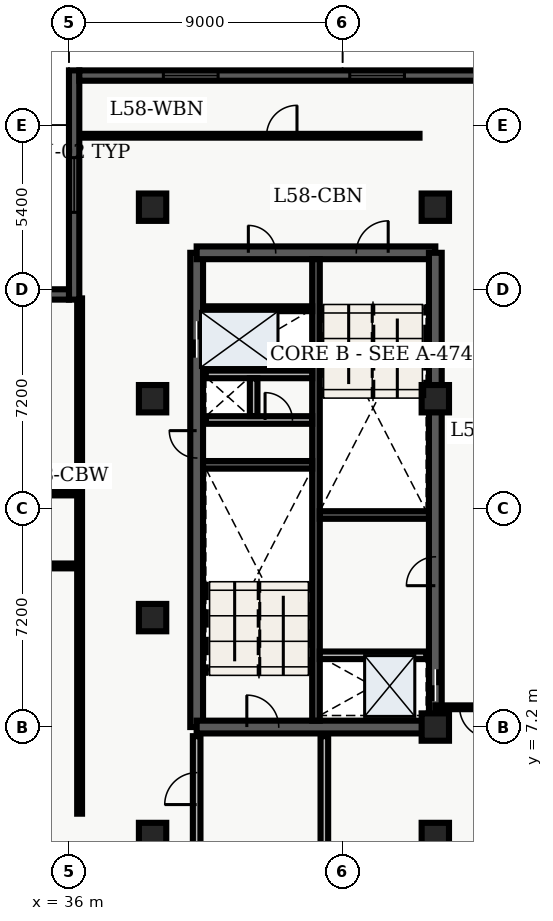
"""IFC4 building model, lengths in metres.
Left out: names, types, materials, properties, quantities, classifications, styles, units other than length and angle.
Written with IfcOpenShell. Run it as: python <this file> out.ifc"""

import sys

from ifc_helpers import new_model, entity, si_unit, converted_unit, direction, frame, origin_with_axes, origin_2d_with_axis, place, context, subcontext, project, spatial, polyline, rectangle, outline, extrude, element, fill, save


model = new_model("IFC4")
c1 = context("Model", 3, precision=1e-05, world=origin_with_axes(), true_north=direction((0.0, 1.0)))
c2 = subcontext(c1, "Body", "Model", "MODEL_VIEW")
j1 = project(units=[si_unit("LENGTHUNIT", "METRE"), converted_unit("PLANEANGLEUNIT", "DEGREE", entity("IfcPlaneAngleMeasure", 0.017), si_unit("PLANEANGLEUNIT", "RADIAN"), dimensions=[0, 0, 0, 0, 0, 0, 0])], contexts=[c1])
p1 = place(None, origin_with_axes())
s1 = spatial("IfcSite", under=j1, at=p1, CompositionType="ELEMENT")
p2 = place(p1, origin_with_axes())
s2 = spatial("IfcBuilding", under=s1, at=p2, CompositionType="ELEMENT")
p3 = place(p2, frame((0.0, 0.0, 236.4), z_axis=(0.0, 0.0, 1.0), x_axis=(1.0, 0.0, 0.0)))
s3 = spatial("IfcBuildingStorey", under=s2, at=p3, CompositionType="ELEMENT", Elevation=236.4)
p4 = place(p3, frame((40.2, 7.2, 0.0), z_axis=(0.0, 0.0, 1.0), x_axis=(0.0, 1.0, 0.0)))
e1 = element("IfcWall", 1, at=p4, inside=s3, PredefinedType="SHEAR", context=c2, shape_type="SweptSolid", body=[
    extrude(outline(polyline([(0.0, -0.21), (15.6, -0.21), (15.6, 0.21), (0.0, 0.21), (0.0, -0.21)])), origin_with_axes(), (0.0, 0.0, 1.0), 3.66),
])
p5 = place(p4, frame((12.75, 0.0, 0.0), z_axis=(0.0, 0.0, 1.0), x_axis=(1.0, 0.0, 0.0)))
e2 = element("IfcOpeningElement", 2, at=p5, cuts=e1, PredefinedType="OPENING", context=c2, shape_type="SweptSolid", body=[
    extrude(rectangle(XDim=1.2, YDim=0.44, at=origin_2d_with_axis()), origin_with_axes(), (0.0, 0.0, 1.0), 2.15),
])
p6 = place(p4, frame((9.3, 0.0, 0.0), z_axis=(0.0, 0.0, 1.0), x_axis=(1.0, 0.0, 0.0)))
e3 = element("IfcOpeningElement", 3, at=p6, cuts=e1, PredefinedType="OPENING", context=c2, shape_type="SweptSolid", body=[
    extrude(rectangle(XDim=0.9, YDim=0.44, at=origin_2d_with_axis()), origin_with_axes(), (0.0, 0.0, 1.0), 2.15),
])
p7 = place(p3, frame((40.2, 7.2, 0.0), z_axis=(0.0, 0.0, 1.0), x_axis=(1.0, 0.0, 0.0)))
e4 = element("IfcWall", 4, at=p7, inside=s3, PredefinedType="SHEAR", context=c2, shape_type="SweptSolid", body=[
    extrude(outline(polyline([(0.0, -0.21), (7.85, -0.21), (7.85, 0.21), (0.0, 0.21), (0.0, -0.21)])), origin_with_axes(), (0.0, 0.0, 1.0), 3.66),
])
p8 = place(p7, frame((2.175, 0.0, 0.0), z_axis=(0.0, 0.0, 1.0), x_axis=(1.0, 0.0, 0.0)))
e5 = element("IfcOpeningElement", 5, at=p8, cuts=e4, PredefinedType="OPENING", context=c2, shape_type="SweptSolid", body=[
    extrude(rectangle(XDim=1.05, YDim=0.44, at=origin_2d_with_axis()), origin_with_axes(), (0.0, 0.0, 1.0), 2.15),
])
p9 = place(p3, frame((40.2, 22.8, 0.0), z_axis=(0.0, 0.0, 1.0), x_axis=(1.0, 0.0, 0.0)))
e6 = element("IfcWall", 6, at=p9, inside=s3, PredefinedType="SHEAR", context=c2, shape_type="SweptSolid", body=[
    extrude(outline(polyline([(0.0, -0.21), (7.85, -0.21), (7.85, 0.21), (0.0, 0.21), (0.0, -0.21)])), origin_with_axes(), (0.0, 0.0, 1.0), 3.66),
])
p10 = place(p9, frame((5.775, 0.0, 0.0), z_axis=(0.0, 0.0, 1.0), x_axis=(1.0, 0.0, 0.0)))
e7 = element("IfcOpeningElement", 7, at=p10, cuts=e6, PredefinedType="OPENING", context=c2, shape_type="SweptSolid", body=[
    extrude(rectangle(XDim=1.05, YDim=0.44, at=origin_2d_with_axis()), origin_with_axes(), (0.0, 0.0, 1.0), 2.15),
])
p11 = place(p9, frame((2.15, 0.0, 0.0), z_axis=(0.0, 0.0, 1.0), x_axis=(1.0, 0.0, 0.0)))
e8 = element("IfcOpeningElement", 8, at=p11, cuts=e6, PredefinedType="OPENING", context=c2, shape_type="SweptSolid", body=[
    extrude(rectangle(XDim=0.9, YDim=0.44, at=origin_2d_with_axis()), origin_with_axes(), (0.0, 0.0, 1.0), 2.15),
])
p12 = place(p3, frame((48.05, 7.2, 0.0), z_axis=(0.0, 0.0, 1.0), x_axis=(0.0, 1.0, 0.0)))
e9 = element("IfcWall", 9, at=p12, inside=s3, PredefinedType="SHEAR", context=c2, shape_type="SweptSolid", body=[
    extrude(outline(polyline([(0.0, -0.21), (15.6, -0.21), (15.6, 0.21), (0.0, 0.21), (0.0, -0.21)])), origin_with_axes(), (0.0, 0.0, 1.0), 3.66),
])
p13 = place(p12, frame((1.375, 0.0, 0.0), z_axis=(0.0, 0.0, 1.0), x_axis=(1.0, 0.0, 0.0)))
e10 = element("IfcOpeningElement", 10, at=p13, cuts=e9, PredefinedType="OPENING", context=c2, shape_type="SweptSolid", body=[
    extrude(rectangle(XDim=1.05, YDim=0.44, at=origin_2d_with_axis()), origin_with_axes(), (0.0, 0.0, 1.0), 2.15),
])
p14 = place(p12, frame((5.125, 0.0, 0.0), z_axis=(0.0, 0.0, 1.0), x_axis=(1.0, 0.0, 0.0)))
e11 = element("IfcOpeningElement", 11, at=p14, cuts=e9, PredefinedType="OPENING", context=c2, shape_type="SweptSolid", body=[
    extrude(rectangle(XDim=0.95, YDim=0.44, at=origin_2d_with_axis()), origin_with_axes(), (0.0, 0.0, 1.0), 2.15),
])
p15 = place(p3, frame((44.125, 7.41, 0.0), z_axis=(0.0, 0.0, 1.0), x_axis=(0.0, 1.0, 0.0)))
e12 = element("IfcWall", 12, at=p15, inside=s3, PredefinedType="SHEAR", context=c2, shape_type="SweptSolid", body=[
    extrude(outline(polyline([(0.0, -0.125), (15.18, -0.125), (15.18, 0.125), (0.0, 0.125), (0.0, -0.125)])), origin_with_axes(), (0.0, 0.0, 1.0), 3.66),
])
for number, where, z_axis, x_axis in (
    (13, (40.41, 15.825, 0.0), (0.0, 0.0, 1.0), (1.0, 0.0, 0.0)),
    (14, (44.25, 14.175, 0.0), (0.0, 0.0, 1.0), (1.0, 0.0, 0.0)),
):
    element("IfcWall", number, at=place(p3, frame(where, z_axis=z_axis, x_axis=x_axis)), inside=s3, PredefinedType="SHEAR", context=c2, shape_type="SweptSolid", body=[
        extrude(outline(polyline([(0.0, -0.125), (3.59, -0.125), (3.59, 0.125), (0.0, 0.125), (0.0, -0.125)])), origin_with_axes(), (0.0, 0.0, 1.0), 3.66),
    ])
p16 = place(p3, frame((40.5, 17.3, 0.0), z_axis=(0.0, 0.0, 1.0), x_axis=(1.0, 0.0, 0.0)))
e15 = element("IfcWall", 15, at=p16, inside=s3, PredefinedType="SOLIDWALL", context=c2, shape_type="SweptSolid", body=[
    extrude(outline(polyline([(0.0, -0.125), (3.5, -0.125), (3.5, 0.125), (0.0, 0.125), (0.0, -0.125)])), origin_with_axes(), (0.0, 0.0, 1.0), 2.7),
])
p17 = place(p16, frame((2.4, 0.0, 0.0), z_axis=(0.0, 0.0, 1.0), x_axis=(1.0, 0.0, 0.0)))
e16 = element("IfcOpeningElement", 16, at=p17, cuts=e15, PredefinedType="OPENING", context=c2, shape_type="SweptSolid", body=[
    extrude(rectangle(XDim=0.9, YDim=0.27, at=origin_2d_with_axis()), origin_with_axes(), (0.0, 0.0, 1.0), 2.15),
])
p18 = place(p3, frame((40.5, 18.8, 0.0), z_axis=(0.0, 0.0, 1.0), x_axis=(1.0, 0.0, 0.0)))
e17 = element("IfcWall", 17, at=p18, inside=s3, PredefinedType="SOLIDWALL", context=c2, shape_type="SweptSolid", body=[
    extrude(outline(polyline([(0.0, -0.125), (3.5, -0.125), (3.5, 0.125), (0.0, 0.125), (0.0, -0.125)])), origin_with_axes(), (0.0, 0.0, 1.0), 2.7),
])
p19 = place(p3, frame((42.075, 17.43, 0.0), z_axis=(0.0, 0.0, 1.0), x_axis=(0.0, 1.0, 0.0)))
e18 = element("IfcWall", 18, at=p19, inside=s3, PredefinedType="SOLIDWALL", context=c2, shape_type="SweptSolid", body=[
    extrude(outline(polyline([(0.0, -0.125), (1.24, -0.125), (1.24, 0.125), (0.0, 0.125), (0.0, -0.125)])), origin_with_axes(), (0.0, 0.0, 1.0), 2.7),
])
p20 = place(p3, frame((40.2, 3.1, 0.0), z_axis=(0.0, 0.0, 1.0), x_axis=(0.0, 1.0, 0.0)))
e19 = element("IfcWall", 19, at=p20, inside=s3, PredefinedType="SOLIDWALL", context=c2, shape_type="SweptSolid", body=[
    extrude(outline(polyline([(0.0, -0.125), (3.8, -0.125), (3.8, 0.125), (0.0, 0.125), (0.0, -0.125)])), origin_with_axes(), (0.0, 0.0, 1.0), 2.7),
])
p21 = place(p20, frame((2.075, 0.0, 0.0), z_axis=(0.0, 0.0, 1.0), x_axis=(1.0, 0.0, 0.0)))
e20 = element("IfcOpeningElement", 20, at=p21, cuts=e19, PredefinedType="OPENING", context=c2, shape_type="SweptSolid", body=[
    extrude(rectangle(XDim=1.05, YDim=0.27, at=origin_2d_with_axis()), origin_with_axes(), (0.0, 0.0, 1.0), 2.15),
])
p22 = place(p3, frame((44.4, 3.1, 0.0), z_axis=(0.0, 0.0, 1.0), x_axis=(0.0, 1.0, 0.0)))
e21 = element("IfcWall", 21, at=p22, inside=s3, PredefinedType="SOLIDWALL", context=c2, shape_type="SweptSolid", body=[
    extrude(outline(polyline([(0.0, -0.125), (3.8, -0.125), (3.8, 0.125), (0.0, 0.125), (0.0, -0.125)])), origin_with_axes(), (0.0, 0.0, 1.0), 2.7),
])
for number, where, z_axis, x_axis in (
    (22, (38.75, 3.6, 0.0), (0.0, 0.0, 1.0), (1.0, 0.0, 0.0)),
    (23, (38.75, 10.8, 0.0), (0.0, 0.0, 1.0), (1.0, 0.0, 0.0)),
    (24, (38.75, 18.0, 0.0), (0.0, 0.0, 1.0), (1.0, 0.0, 0.0)),
    (25, (38.75, 24.3, 0.0), (0.0, 0.0, 1.0), (1.0, 0.0, 0.0)),
    (26, (48.05, 3.6, 0.0), (0.0, 0.0, 1.0), (1.0, 0.0, 0.0)),
    (27, (48.05, 7.2, 0.0), (0.0, 0.0, 1.0), (1.0, 0.0, 0.0)),
    (28, (48.05, 18.0, 0.0), (0.0, 0.0, 1.0), (1.0, 0.0, 0.0)),
    (29, (48.05, 24.3, 0.0), (0.0, 0.0, 1.0), (1.0, 0.0, 0.0)),
):
    element("IfcColumn", number, at=place(p3, frame(where, z_axis=z_axis, x_axis=x_axis)), inside=s3, PredefinedType="COLUMN", context=c2, shape_type="SweptSolid", body=[
        extrude(rectangle(XDim=0.9, YDim=0.9, at=origin_2d_with_axis()), origin_with_axes(), (0.0, 0.0, 1.0), 3.9),
    ])
p23 = place(p3, frame((40.5, 20.96, 0.0), z_axis=(0.0, 0.0, 1.0), x_axis=(1.0, 0.0, 0.0)))
e30 = element("IfcWall", 30, at=p23, inside=s3, PredefinedType="PARTITIONING", context=c2, shape_type="SweptSolid", body=[
    extrude(outline(polyline([(0.0, -0.08), (3.5, -0.08), (3.5, 0.08), (0.0, 0.08), (0.0, -0.08)])), origin_with_axes(), (0.0, 0.0, 1.0), 2.7),
])
p24 = place(p3, frame((44.25, 9.56, 0.0), z_axis=(0.0, 0.0, 1.0), x_axis=(1.0, 0.0, 0.0)))
e31 = element("IfcWall", 31, at=p24, inside=s3, PredefinedType="SOLIDWALL", context=c2, shape_type="SweptSolid", body=[
    extrude(outline(polyline([(0.0, -0.125), (3.5, -0.125), (3.5, 0.125), (0.0, 0.125), (0.0, -0.125)])), origin_with_axes(), (0.0, 0.0, 1.0), 2.7),
])
p25 = place(p3, frame((20.3, 12.5, 0.0), z_axis=(0.0, 0.0, 1.0), x_axis=(1.0, 0.0, 0.0)))
e32 = element("IfcWall", 32, at=p25, inside=s3, PredefinedType="PARTITIONING", context=c2, shape_type="SweptSolid", body=[
    extrude(outline(polyline([(0.0, -0.08), (16.05, -0.08), (16.05, 0.08), (0.0, 0.08), (0.0, -0.08)])), origin_with_axes(), (0.0, 0.0, 1.0), 2.7),
])
p26 = place(p25, frame((3.865, 0.0, 0.0), z_axis=(0.0, 0.0, 1.0), x_axis=(1.0, 0.0, 0.0)))
e33 = element("IfcOpeningElement", 33, at=p26, cuts=e32, PredefinedType="OPENING", context=c2, shape_type="SweptSolid", body=[
    extrude(rectangle(XDim=1.2, YDim=0.18, at=origin_2d_with_axis()), origin_with_axes(), (0.0, 0.0, 1.0), 2.2),
])
p27 = place(p25, frame((9.48, 0.0, 0.0), z_axis=(0.0, 0.0, 1.0), x_axis=(1.0, 0.0, 0.0)))
e34 = element("IfcOpeningElement", 34, at=p27, cuts=e32, PredefinedType="OPENING", context=c2, shape_type="SweptSolid", body=[
    extrude(rectangle(XDim=1.0, YDim=0.18, at=origin_2d_with_axis()), origin_with_axes(), (0.0, 0.0, 1.0), 2.15),
])
p28 = place(p25, frame((13.691, 0.0, 0.0), z_axis=(0.0, 0.0, 1.0), x_axis=(1.0, 0.0, 0.0)))
e35 = element("IfcOpeningElement", 35, at=p28, cuts=e32, PredefinedType="OPENING", context=c2, shape_type="SweptSolid", body=[
    extrude(rectangle(XDim=1.0, YDim=0.18, at=origin_2d_with_axis()), origin_with_axes(), (0.0, 0.0, 1.0), 2.15),
])
p29 = place(p3, frame((20.3, 14.9, 0.0), z_axis=(0.0, 0.0, 1.0), x_axis=(1.0, 0.0, 0.0)))
e36 = element("IfcWall", 36, at=p29, inside=s3, PredefinedType="PARTITIONING", context=c2, shape_type="SweptSolid", body=[
    extrude(outline(polyline([(0.0, -0.08), (16.05, -0.08), (16.05, 0.08), (0.0, 0.08), (0.0, -0.08)])), origin_with_axes(), (0.0, 0.0, 1.0), 2.7),
])
p30 = place(p29, frame((8.075, 0.0, 0.0), z_axis=(0.0, 0.0, 1.0), x_axis=(1.0, 0.0, 0.0)))
e37 = element("IfcOpeningElement", 37, at=p30, cuts=e36, PredefinedType="OPENING", context=c2, shape_type="SweptSolid", body=[
    extrude(rectangle(XDim=1.2, YDim=0.18, at=origin_2d_with_axis()), origin_with_axes(), (0.0, 0.0, 1.0), 2.2),
])
p31 = place(p3, frame((36.35, 4.35, 0.0), z_axis=(0.0, 0.0, 1.0), x_axis=(0.0, 1.0, 0.0)))
e38 = element("IfcWall", 38, at=p31, inside=s3, PredefinedType="PARTITIONING", context=c2, shape_type="SweptSolid", body=[
    extrude(outline(polyline([(0.0, -0.08), (16.95, -0.08), (16.95, 0.08), (0.0, 0.08), (0.0, -0.08)])), origin_with_axes(), (0.0, 0.0, 1.0), 2.7),
])
p32 = place(p3, frame((51.865, 7.85, 0.0), z_axis=(0.0, 0.0, 1.0), x_axis=(-1.0, 0.0, 0.0)))
e39 = element("IfcWall", 39, at=p32, inside=s3, PredefinedType="PARTITIONING", context=c2, shape_type="SweptSolid", body=[
    extrude(outline(polyline([(0.0, -0.062), (3.815, -0.062), (3.815, 0.062), (0.0, 0.062), (0.0, -0.062)])), origin_with_axes(), (0.0, 0.0, 1.0), 2.7),
])
p33 = place(p32, frame((2.515, 0.0, 0.0), z_axis=(0.0, 0.0, 1.0), x_axis=(1.0, 0.0, 0.0)))
e40 = element("IfcOpeningElement", 40, at=p33, cuts=e39, PredefinedType="OPENING", context=c2, shape_type="SweptSolid", body=[
    extrude(rectangle(XDim=1.0, YDim=0.145, at=origin_2d_with_axis()), origin_with_axes(), (0.0, 0.0, 1.0), 2.15),
])
p34 = place(p3, frame((36.335, 26.65, 0.0), z_axis=(0.0, 0.0, 1.0), x_axis=(1.0, 0.0, 0.0)))
e41 = element("IfcWall", 41, at=p34, inside=s3, PredefinedType="PARTITIONING", context=c2, shape_type="SweptSolid", body=[
    extrude(outline(polyline([(0.0, -0.062), (11.195, -0.062), (11.195, 0.062), (0.0, 0.062), (0.0, -0.062)])), origin_with_axes(), (0.0, 0.0, 1.0), 2.7),
])
p35 = place(p34, frame((6.665, 0.0, 0.0), z_axis=(0.0, 0.0, 1.0), x_axis=(1.0, 0.0, 0.0)))
e42 = element("IfcOpeningElement", 42, at=p35, cuts=e41, PredefinedType="OPENING", context=c2, shape_type="SweptSolid", body=[
    extrude(rectangle(XDim=1.0, YDim=0.145, at=origin_2d_with_axis()), origin_with_axes(), (0.0, 0.0, 1.0), 2.15),
])
p36 = place(p3, frame((36.17, 21.26, 0.0), z_axis=(0.0, 0.0, 1.0), x_axis=(0.0, 1.0, 0.0)))
e43 = element("IfcWall", 43, at=p36, inside=s3, PredefinedType="SOLIDWALL", context=c2, shape_type="SweptSolid", body=[
    extrude(outline(polyline([(0.0, -0.17), (7.54, -0.17), (7.54, 0.17), (0.0, 0.17), (0.0, -0.17)])), origin_with_axes(), (0.0, 0.0, 1.0), 3.66),
])
p37 = place(p36, frame((3.77, 0.0, 0.45), z_axis=(0.0, 0.0, 1.0), x_axis=(1.0, 0.0, 0.0)))
e44 = element("IfcOpeningElement", 44, at=p37, cuts=e43, PredefinedType="OPENING", context=c2, shape_type="SweptSolid", body=[
    extrude(rectangle(XDim=1.8, YDim=0.36, at=origin_2d_with_axis()), origin_with_axes(), (0.0, 0.0, 1.0), 2.1),
])
p38 = place(p3, frame((36.34, 28.63, 0.0), z_axis=(0.0, 0.0, 1.0), x_axis=(1.0, 0.0, 0.0)))
e45 = element("IfcWall", 45, at=p38, inside=s3, PredefinedType="SOLIDWALL", context=c2, shape_type="SweptSolid", body=[
    extrude(outline(polyline([(0.0, -0.17), (13.46, -0.17), (13.46, 0.17), (0.0, 0.17), (0.0, -0.17)])), origin_with_axes(), (0.0, 0.0, 1.0), 3.66),
])
p39 = place(p38, frame((3.665, 0.0, 0.45), z_axis=(0.0, 0.0, 1.0), x_axis=(1.0, 0.0, 0.0)))
e46 = element("IfcOpeningElement", 46, at=p39, cuts=e45, PredefinedType="OPENING", context=c2, shape_type="SweptSolid", body=[
    extrude(rectangle(XDim=1.8, YDim=0.36, at=origin_2d_with_axis()), origin_with_axes(), (0.0, 0.0, 1.0), 2.1),
])
p40 = place(p38, frame((9.795, 0.0, 0.45), z_axis=(0.0, 0.0, 1.0), x_axis=(1.0, 0.0, 0.0)))
e47 = element("IfcOpeningElement", 47, at=p40, cuts=e45, PredefinedType="OPENING", context=c2, shape_type="SweptSolid", body=[
    extrude(rectangle(XDim=1.8, YDim=0.36, at=origin_2d_with_axis()), origin_with_axes(), (0.0, 0.0, 1.0), 2.1),
])
p41 = place(p3, frame((32.06, 21.43, 0.0), z_axis=(0.0, 0.0, 1.0), x_axis=(1.0, 0.0, 0.0)))
e48 = element("IfcWall", 48, at=p41, inside=s3, PredefinedType="SOLIDWALL", context=c2, shape_type="SweptSolid", body=[
    extrude(outline(polyline([(0.0, -0.17), (3.94, -0.17), (3.94, 0.17), (0.0, 0.17), (0.0, -0.17)])), origin_with_axes(), (0.0, 0.0, 1.0), 3.66),
])
p42 = place(p12, frame((1.375, 0.0, 0.0), z_axis=(0.0, 0.0, 1.0), x_axis=(1.0, 0.0, 0.0)))
e49 = element("IfcDoor", 49, at=p42, inside=s3, OperationType="SLIDING_TO_LEFT", PredefinedType="DOOR", context=c2, shape_type="SweptSolid", body=[
    extrude(rectangle(XDim=1.05, YDim=0.09, at=origin_2d_with_axis()), origin_with_axes(), (0.0, 0.0, 1.0), 2.15),
])
fill(e10, e49)
p43 = place(p4, frame((12.75, 0.0, 0.0), z_axis=(0.0, 0.0, 1.0), x_axis=(1.0, 0.0, 0.0)))
e50 = element("IfcDoor", 50, at=p43, inside=s3, OperationType="DOUBLE_DOOR_SLIDING", PredefinedType="DOOR", context=c2, shape_type="SweptSolid", body=[
    extrude(rectangle(XDim=1.2, YDim=0.09, at=origin_2d_with_axis()), origin_with_axes(), (0.0, 0.0, 1.0), 2.15),
])
fill(e2, e50)
p44 = place(p4, frame((9.3, 0.0, 0.0), z_axis=(0.0, 0.0, 1.0), x_axis=(1.0, 0.0, 0.0)))
e51 = element("IfcDoor", 51, at=p44, inside=s3, OperationType="SINGLE_SWING_RIGHT", PredefinedType="DOOR", context=c2, shape_type="SweptSolid", body=[
    extrude(rectangle(XDim=0.9, YDim=0.09, at=origin_2d_with_axis()), origin_with_axes(), (0.0, 0.0, 1.0), 2.15),
])
fill(e3, e51)
p45 = place(p16, frame((2.4, 0.0, 0.0), z_axis=(0.0, 0.0, 1.0), x_axis=(1.0, 0.0, 0.0)))
e52 = element("IfcDoor", 52, at=p45, inside=s3, OperationType="SINGLE_SWING_LEFT", PredefinedType="DOOR", context=c2, shape_type="SweptSolid", body=[
    extrude(rectangle(XDim=0.9, YDim=0.09, at=origin_2d_with_axis()), origin_with_axes(), (0.0, 0.0, 1.0), 2.15),
])
fill(e16, e52)
p46 = place(p7, frame((2.175, 0.0, 0.0), z_axis=(0.0, 0.0, 1.0), x_axis=(1.0, 0.0, 0.0)))
e53 = element("IfcDoor", 53, at=p46, inside=s3, OperationType="SINGLE_SWING_LEFT", PredefinedType="DOOR", context=c2, shape_type="SweptSolid", body=[
    extrude(rectangle(XDim=1.05, YDim=0.09, at=origin_2d_with_axis()), origin_with_axes(), (0.0, 0.0, 1.0), 2.15),
])
fill(e5, e53)
p47 = place(p9, frame((5.775, 0.0, 0.0), z_axis=(0.0, 0.0, 1.0), x_axis=(1.0, 0.0, 0.0)))
e54 = element("IfcDoor", 54, at=p47, inside=s3, OperationType="SINGLE_SWING_RIGHT", PredefinedType="DOOR", context=c2, shape_type="SweptSolid", body=[
    extrude(rectangle(XDim=1.05, YDim=0.09, at=origin_2d_with_axis()), origin_with_axes(), (0.0, 0.0, 1.0), 2.15),
])
fill(e7, e54)
p48 = place(p20, frame((2.075, 0.0, 0.0), z_axis=(0.0, 0.0, 1.0), x_axis=(1.0, 0.0, 0.0)))
e55 = element("IfcDoor", 55, at=p48, inside=s3, OperationType="SINGLE_SWING_LEFT", PredefinedType="DOOR", context=c2, shape_type="SweptSolid", body=[
    extrude(rectangle(XDim=1.05, YDim=0.09, at=origin_2d_with_axis()), origin_with_axes(), (0.0, 0.0, 1.0), 2.15),
])
fill(e20, e55)
p49 = place(p9, frame((2.15, 0.0, 0.0), z_axis=(0.0, 0.0, 1.0), x_axis=(1.0, 0.0, 0.0)))
e56 = element("IfcDoor", 56, at=p49, inside=s3, OperationType="SINGLE_SWING_LEFT", PredefinedType="DOOR", context=c2, shape_type="SweptSolid", body=[
    extrude(rectangle(XDim=0.9, YDim=0.09, at=origin_2d_with_axis()), origin_with_axes(), (0.0, 0.0, 1.0), 2.15),
])
fill(e8, e56)
p50 = place(p12, frame((5.125, 0.0, 0.0), z_axis=(0.0, 0.0, 1.0), x_axis=(1.0, 0.0, 0.0)))
e57 = element("IfcDoor", 57, at=p50, inside=s3, OperationType="SINGLE_SWING_LEFT", PredefinedType="DOOR", context=c2, shape_type="SweptSolid", body=[
    extrude(rectangle(XDim=0.95, YDim=0.09, at=origin_2d_with_axis()), origin_with_axes(), (0.0, 0.0, 1.0), 2.15),
])
fill(e11, e57)
p51 = place(p32, frame((2.515, 0.0, 0.0), z_axis=(0.0, 0.0, 1.0), x_axis=(1.0, 0.0, 0.0)))
e58 = element("IfcDoor", 58, at=p51, inside=s3, OperationType="SINGLE_SWING_LEFT", PredefinedType="DOOR", context=c2, shape_type="SweptSolid", body=[
    extrude(rectangle(XDim=1.0, YDim=0.075, at=origin_2d_with_axis()), origin_with_axes(), (0.0, 0.0, 1.0), 2.15),
])
fill(e40, e58)
p52 = place(p34, frame((6.665, 0.0, 0.0), z_axis=(0.0, 0.0, 1.0), x_axis=(1.0, 0.0, 0.0)))
e59 = element("IfcDoor", 59, at=p52, inside=s3, OperationType="SINGLE_SWING_RIGHT", PredefinedType="DOOR", context=c2, shape_type="SweptSolid", body=[
    extrude(rectangle(XDim=1.0, YDim=0.075, at=origin_2d_with_axis()), origin_with_axes(), (0.0, 0.0, 1.0), 2.15),
])
fill(e42, e59)
p53 = place(p36, frame((3.77, 0.0, 0.45), z_axis=(0.0, 0.0, 1.0), x_axis=(1.0, 0.0, 0.0)))
e60 = element("IfcWindow", 60, at=p53, inside=s3, PredefinedType="WINDOW", context=c2, shape_type="SweptSolid", body=[
    extrude(rectangle(XDim=1.8, YDim=0.09, at=origin_2d_with_axis()), origin_with_axes(), (0.0, 0.0, 1.0), 2.1),
])
fill(e44, e60)
p54 = place(p38, frame((3.665, 0.0, 0.45), z_axis=(0.0, 0.0, 1.0), x_axis=(1.0, 0.0, 0.0)))
e61 = element("IfcWindow", 61, at=p54, inside=s3, PredefinedType="WINDOW", context=c2, shape_type="SweptSolid", body=[
    extrude(rectangle(XDim=1.8, YDim=0.09, at=origin_2d_with_axis()), origin_with_axes(), (0.0, 0.0, 1.0), 2.1),
])
fill(e46, e61)
p55 = place(p38, frame((9.795, 0.0, 0.45), z_axis=(0.0, 0.0, 1.0), x_axis=(1.0, 0.0, 0.0)))
e62 = element("IfcWindow", 62, at=p55, inside=s3, PredefinedType="WINDOW", context=c2, shape_type="SweptSolid", body=[
    extrude(rectangle(XDim=1.8, YDim=0.09, at=origin_2d_with_axis()), origin_with_axes(), (0.0, 0.0, 1.0), 2.1),
])
fill(e47, e62)
save(model, sys.argv[1])
